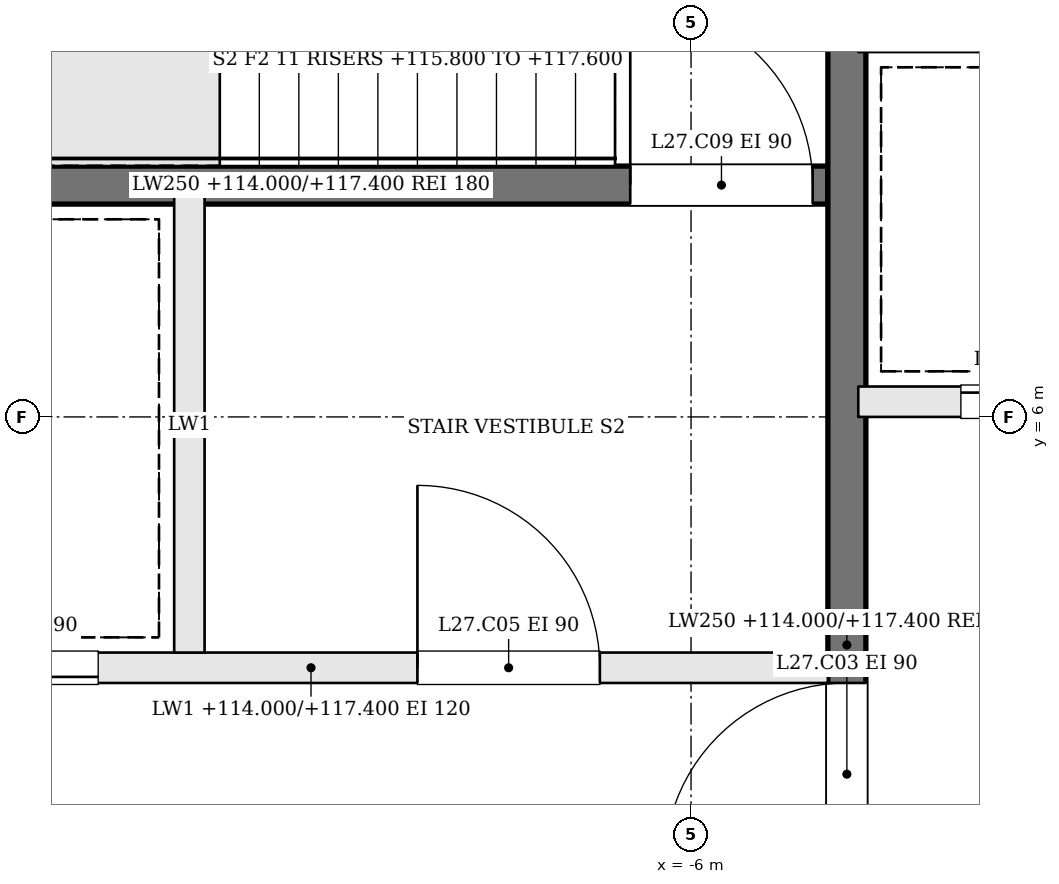
"""IFC4 building model, lengths in metres.
Left out: names, types, materials, properties, quantities, classifications, styles, units other than length and angle.
Written with IfcOpenShell. Run it as: python <this file> out.ifc"""

import sys

from ifc_helpers import new_model, si_unit, direction, frame, frame_2d, origin, place, context, subcontext, project, spatial, rectangle, extrude, element, fill, save


model = new_model("IFC4")
c1 = context("Model", 3, precision=1e-05, world=origin(), true_north=direction((0.0, 1.0)))
c2 = subcontext(c1, "Body", "Model", "MODEL_VIEW")
j1 = project(units=[si_unit("LENGTHUNIT", "METRE"), si_unit("PLANEANGLEUNIT", "RADIAN")], contexts=[c1])
p1 = place(None, origin())
s1 = spatial("IfcSite", under=j1, at=p1, CompositionType="ELEMENT")
p2 = place(p1, origin())
s2 = spatial("IfcBuilding", under=s1, at=p2, CompositionType="ELEMENT")
p3 = place(p2, frame((0.0, 0.0, 114.0)))
s3 = spatial("IfcBuildingStorey", under=s2, at=p3, CompositionType="ELEMENT", Elevation=114.0)
p4 = place(p3, frame((-11.9, 4.35, 0.0), z_axis=(0.0, 0.0, 1.0), x_axis=(1.0, 0.0, 0.0)))
e1 = element("IfcWall", 1, at=p4, inside=s3, PredefinedType="SOLIDWALL", context=c2, shape_type="SweptSolid", body=[
    extrude(rectangle(XDim=6.8, YDim=0.2, at=frame_2d((3.4, 0.0))), origin(), (0.0, 0.0, 1.0), 3.4),
])
p5 = place(p4, frame((4.1, 0.0, 0.0)))
e2 = element("IfcOpeningElement", 2, at=p5, cuts=e1, PredefinedType="OPENING", context=c2, shape_type="SweptSolid", body=[
    extrude(rectangle(XDim=1.2, YDim=2.1, at=frame_2d((0.6, 1.05))), frame((0.0, 0.11, 0.0), z_axis=(0.0, -1.0, 0.0), x_axis=(1.0, 0.0, 0.0)), (0.0, 0.0, 1.0), 0.22),
])
p6 = place(p4, frame((0.8, 0.0, 0.0)))
e3 = element("IfcOpeningElement", 3, at=p6, cuts=e1, PredefinedType="OPENING", context=c2, shape_type="SweptSolid", body=[
    extrude(rectangle(XDim=1.2, YDim=2.1, at=frame_2d((0.6, 1.05))), frame((0.0, 0.11, 0.0), z_axis=(0.0, -1.0, 0.0), x_axis=(1.0, 0.0, 0.0)), (0.0, 0.0, 1.0), 0.22),
])
p7 = place(p3, frame((-11.9, 7.525, 0.0), z_axis=(0.0, 0.0, 1.0), x_axis=(1.0, 0.0, 0.0)))
e4 = element("IfcWall", 4, at=p7, inside=s3, PredefinedType="SOLIDWALL", context=c2, shape_type="SweptSolid", body=[
    extrude(rectangle(XDim=6.8, YDim=0.25, at=frame_2d((3.4, 0.0))), origin(), (0.0, 0.0, 1.0), 3.4),
])
p8 = place(p7, frame((5.5, 0.0, 0.0)))
e5 = element("IfcOpeningElement", 5, at=p8, cuts=e4, PredefinedType="OPENING", context=c2, shape_type="SweptSolid", body=[
    extrude(rectangle(XDim=1.2, YDim=2.1, at=frame_2d((0.6, 1.05))), frame((0.0, 0.135, 0.0), z_axis=(0.0, -1.0, 0.0), x_axis=(1.0, 0.0, 0.0)), (0.0, 0.0, 1.0), 0.27),
])
p9 = place(p3, frame((-9.3, 4.45, 0.0), z_axis=(0.0, 0.0, 1.0), x_axis=(0.0, 1.0, 0.0)))
e6 = element("IfcWall", 6, at=p9, inside=s3, PredefinedType="SOLIDWALL", context=c2, shape_type="SweptSolid", body=[
    extrude(rectangle(XDim=3.0, YDim=0.2, at=frame_2d((1.5, 0.0))), origin(), (0.0, 0.0, 1.0), 3.4),
])
p10 = place(p3, frame((-4.975, -1.9, 0.0), z_axis=(0.0, 0.0, 1.0), x_axis=(0.0, 1.0, 0.0)))
e7 = element("IfcWall", 7, at=p10, inside=s3, PredefinedType="SOLIDWALL", context=c2, shape_type="SweptSolid", body=[
    extrude(rectangle(XDim=12.8, YDim=0.25, at=frame_2d((6.4, 0.0))), origin(), (0.0, 0.0, 1.0), 3.4),
])
p11 = place(p10, frame((4.95, 0.0, 0.0)))
e8 = element("IfcOpeningElement", 8, at=p11, cuts=e7, PredefinedType="OPENING", context=c2, shape_type="SweptSolid", body=[
    extrude(rectangle(XDim=1.2, YDim=2.1, at=frame_2d((0.6, 1.05))), frame((0.0, 0.135, 0.0), z_axis=(0.0, -1.0, 0.0), x_axis=(1.0, 0.0, 0.0)), (0.0, 0.0, 1.0), 0.27),
])
p12 = place(p3, frame((-4.9, 6.1, 0.0), z_axis=(0.0, 0.0, 1.0), x_axis=(1.0, 0.0, 0.0)))
e9 = element("IfcWall", 9, at=p12, inside=s3, PredefinedType="SOLIDWALL", context=c2, shape_type="SweptSolid", body=[
    extrude(rectangle(XDim=9.8, YDim=0.2, at=frame_2d((4.9, 0.0))), origin(), (0.0, 0.0, 1.0), 3.4),
])
p13 = place(p12, frame((0.675, 0.0, 0.0)))
e10 = element("IfcOpeningElement", 10, at=p13, cuts=e9, PredefinedType="OPENING", context=c2, shape_type="SweptSolid", body=[
    extrude(rectangle(XDim=1.1, YDim=2.1, at=frame_2d((0.55, 1.05))), frame((0.0, 0.11, 0.0), z_axis=(0.0, -1.0, 0.0), x_axis=(1.0, 0.0, 0.0)), (0.0, 0.0, 1.0), 0.22),
])
p14 = place(p12, frame((3.125, 0.0, 0.0)))
e11 = element("IfcOpeningElement", 11, at=p14, cuts=e9, PredefinedType="OPENING", context=c2, shape_type="SweptSolid", body=[
    extrude(rectangle(XDim=1.1, YDim=2.1, at=frame_2d((0.55, 1.05))), frame((0.0, 0.11, 0.0), z_axis=(0.0, -1.0, 0.0), x_axis=(1.0, 0.0, 0.0)), (0.0, 0.0, 1.0), 0.22),
])
p15 = place(p12, frame((5.575, 0.0, 0.0)))
e12 = element("IfcOpeningElement", 12, at=p15, cuts=e9, PredefinedType="OPENING", context=c2, shape_type="SweptSolid", body=[
    extrude(rectangle(XDim=1.1, YDim=2.1, at=frame_2d((0.55, 1.05))), frame((0.0, 0.11, 0.0), z_axis=(0.0, -1.0, 0.0), x_axis=(1.0, 0.0, 0.0)), (0.0, 0.0, 1.0), 0.22),
])
p16 = place(p12, frame((8.025, 0.0, 0.0)))
e13 = element("IfcOpeningElement", 13, at=p16, cuts=e9, PredefinedType="OPENING", context=c2, shape_type="SweptSolid", body=[
    extrude(rectangle(XDim=1.1, YDim=2.1, at=frame_2d((0.55, 1.05))), frame((0.0, 0.11, 0.0), z_axis=(0.0, -1.0, 0.0), x_axis=(1.0, 0.0, 0.0)), (0.0, 0.0, 1.0), 0.22),
])
p17 = place(p11, origin())
e14 = element("IfcDoor", 14, at=p17, inside=s3, OperationType="SINGLE_SWING_LEFT", PredefinedType="DOOR", context=c2, shape_type="SweptSolid", body=[
    extrude(rectangle(XDim=1.2, YDim=2.1, at=frame_2d((0.6, 1.05))), frame((0.0, 0.025, 0.0), z_axis=(0.0, -1.0, 0.0), x_axis=(1.0, 0.0, 0.0)), (0.0, 0.0, 1.0), 0.05),
])
fill(e8, e14)
p18 = place(p5, origin())
e15 = element("IfcDoor", 15, at=p18, inside=s3, OperationType="SINGLE_SWING_LEFT", PredefinedType="DOOR", context=c2, shape_type="SweptSolid", body=[
    extrude(rectangle(XDim=1.2, YDim=2.1, at=frame_2d((0.6, 1.05))), frame((0.0, 0.025, 0.0), z_axis=(0.0, -1.0, 0.0), x_axis=(1.0, 0.0, 0.0)), (0.0, 0.0, 1.0), 0.05),
])
fill(e2, e15)
p19 = place(p8, origin())
e16 = element("IfcDoor", 16, at=p19, inside=s3, OperationType="SINGLE_SWING_LEFT", PredefinedType="DOOR", context=c2, shape_type="SweptSolid", body=[
    extrude(rectangle(XDim=1.2, YDim=2.1, at=frame_2d((0.6, 1.05))), frame((0.0, 0.025, 0.0), z_axis=(0.0, -1.0, 0.0), x_axis=(1.0, 0.0, 0.0)), (0.0, 0.0, 1.0), 0.05),
])
fill(e5, e16)
p20 = place(p6, origin())
e17 = element("IfcDoor", 17, at=p20, inside=s3, OperationType="SLIDING_TO_RIGHT", PredefinedType="DOOR", context=c2, shape_type="SweptSolid", body=[
    extrude(rectangle(XDim=1.2, YDim=2.1, at=frame_2d((0.6, 1.05))), frame((0.0, 0.025, 0.0), z_axis=(0.0, -1.0, 0.0), x_axis=(1.0, 0.0, 0.0)), (0.0, 0.0, 1.0), 0.05),
])
fill(e3, e17)
p21 = place(p13, origin())
e18 = element("IfcDoor", 18, at=p21, inside=s3, OperationType="SLIDING_TO_RIGHT", PredefinedType="DOOR", context=c2, shape_type="SweptSolid", body=[
    extrude(rectangle(XDim=1.1, YDim=2.1, at=frame_2d((0.55, 1.05))), frame((0.0, 0.025, 0.0), z_axis=(0.0, -1.0, 0.0), x_axis=(1.0, 0.0, 0.0)), (0.0, 0.0, 1.0), 0.05),
])
fill(e10, e18)
save(model, sys.argv[1])
